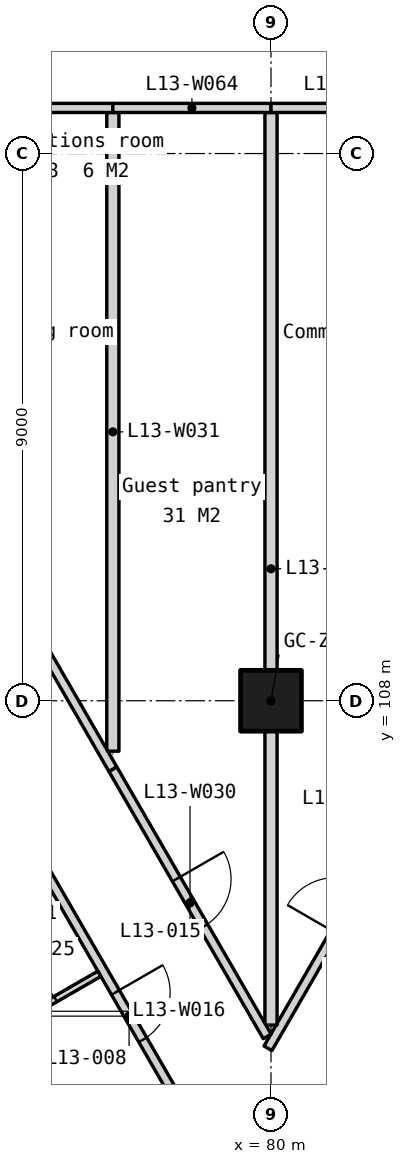
"""IFC4 building model, lengths in metres.
Left out: names, types, materials, properties, quantities, classifications, styles, units other than length and angle.
Written with IfcOpenShell. Run it as: python <this file> out.ifc"""

import sys

from ifc_helpers import new_model, si_unit, direction, frame, frame_2d, origin, origin_2d, place, context, subcontext, project, spatial, polyline, rectangle, outline, extrude, element, fill, save


model = new_model("IFC4")
c1 = context("Model", 3, precision=1e-05, world=origin(), true_north=direction((0.0, 1.0)))
c2 = subcontext(c1, "Body", "Model", "MODEL_VIEW")
j1 = project(units=[si_unit("LENGTHUNIT", "METRE"), si_unit("PLANEANGLEUNIT", "RADIAN")], contexts=[c1])
p1 = place(None, origin())
s1 = spatial("IfcSite", under=j1, at=p1, CompositionType="ELEMENT")
p2 = place(p1, origin())
s2 = spatial("IfcBuilding", under=s1, at=p2, CompositionType="ELEMENT")
p3 = place(p2, frame((0.0, 0.0, 59.5)))
s3 = spatial("IfcBuildingStorey", under=s2, at=p3, CompositionType="ELEMENT", Elevation=59.5)
p4 = place(p3, frame((80.0, 108.0, 0.0), z_axis=(0.0, 0.0, 1.0), x_axis=(1.0, 0.0, 0.0)))
e1 = element("IfcColumn", 1, at=p4, inside=s3, PredefinedType="COLUMN", context=c2, shape_type="SweptSolid", body=[
    extrude(rectangle(XDim=1.0, YDim=1.0, at=origin_2d()), origin(), (0.0, 0.0, 1.0), 3.5),
])
p5 = place(p3, frame((54.495, 129.397, -0.15), z_axis=(0.0, 0.0, 1.0), x_axis=(0.499999201451, -0.866025864826, 0.0)))
e2 = element("IfcWall", 2, at=p5, inside=s3, PredefinedType="SOLIDWALL", context=c2, shape_type="SweptSolid", body=[
    extrude(outline(polyline([(44.8, 0.0), (44.8, 3.5), (0.0, 3.5), (0.0, 0.0), (44.8, 0.0)])), frame((0.0, 0.225, 0.0), z_axis=(0.0, -1.0, 0.0), x_axis=(1.0, 0.0, 0.0)), (0.0, 0.0, 1.0), 0.45),
])
p6 = place(p5, frame((3.03, 0.0, 1.05)))
e3 = element("IfcOpeningElement", 3, at=p6, cuts=e2, PredefinedType="OPENING", context=c2, shape_type="SweptSolid", body=[
    extrude(rectangle(XDim=1.2, YDim=1.5, at=frame_2d((0.6, 0.75))), frame((0.0, 0.235, 0.0), z_axis=(0.0, -1.0, 0.0), x_axis=(1.0, 0.0, 0.0)), (0.0, 0.0, 1.0), 0.47),
])
p7 = place(p5, frame((4.73, 0.0, 1.05)))
e4 = element("IfcOpeningElement", 4, at=p7, cuts=e2, PredefinedType="OPENING", context=c2, shape_type="SweptSolid", body=[
    extrude(rectangle(XDim=1.2, YDim=1.5, at=frame_2d((0.6, 0.75))), frame((0.0, 0.235, 0.0), z_axis=(0.0, -1.0, 0.0), x_axis=(1.0, 0.0, 0.0)), (0.0, 0.0, 1.0), 0.47),
])
p8 = place(p5, frame((11.99, 0.0, 1.05)))
e5 = element("IfcOpeningElement", 5, at=p8, cuts=e2, PredefinedType="OPENING", context=c2, shape_type="SweptSolid", body=[
    extrude(rectangle(XDim=1.2, YDim=1.5, at=frame_2d((0.6, 0.75))), frame((0.0, 0.235, 0.0), z_axis=(0.0, -1.0, 0.0), x_axis=(1.0, 0.0, 0.0)), (0.0, 0.0, 1.0), 0.47),
])
p9 = place(p5, frame((13.69, 0.0, 1.05)))
e6 = element("IfcOpeningElement", 6, at=p9, cuts=e2, PredefinedType="OPENING", context=c2, shape_type="SweptSolid", body=[
    extrude(rectangle(XDim=1.2, YDim=1.5, at=frame_2d((0.6, 0.75))), frame((0.0, 0.235, 0.0), z_axis=(0.0, -1.0, 0.0), x_axis=(1.0, 0.0, 0.0)), (0.0, 0.0, 1.0), 0.47),
])
p10 = place(p5, frame((20.95, 0.0, 1.05)))
e7 = element("IfcOpeningElement", 7, at=p10, cuts=e2, PredefinedType="OPENING", context=c2, shape_type="SweptSolid", body=[
    extrude(rectangle(XDim=1.2, YDim=1.5, at=frame_2d((0.6, 0.75))), frame((0.0, 0.235, 0.0), z_axis=(0.0, -1.0, 0.0), x_axis=(1.0, 0.0, 0.0)), (0.0, 0.0, 1.0), 0.47),
])
p11 = place(p5, frame((22.65, 0.0, 1.05)))
e8 = element("IfcOpeningElement", 8, at=p11, cuts=e2, PredefinedType="OPENING", context=c2, shape_type="SweptSolid", body=[
    extrude(rectangle(XDim=1.2, YDim=1.5, at=frame_2d((0.6, 0.75))), frame((0.0, 0.235, 0.0), z_axis=(0.0, -1.0, 0.0), x_axis=(1.0, 0.0, 0.0)), (0.0, 0.0, 1.0), 0.47),
])
p12 = place(p5, frame((29.91, 0.0, 1.05)))
e9 = element("IfcOpeningElement", 9, at=p12, cuts=e2, PredefinedType="OPENING", context=c2, shape_type="SweptSolid", body=[
    extrude(rectangle(XDim=1.2, YDim=1.5, at=frame_2d((0.6, 0.75))), frame((0.0, 0.235, 0.0), z_axis=(0.0, -1.0, 0.0), x_axis=(1.0, 0.0, 0.0)), (0.0, 0.0, 1.0), 0.47),
])
p13 = place(p5, frame((31.61, 0.0, 1.05)))
e10 = element("IfcOpeningElement", 10, at=p13, cuts=e2, PredefinedType="OPENING", context=c2, shape_type="SweptSolid", body=[
    extrude(rectangle(XDim=1.2, YDim=1.5, at=frame_2d((0.6, 0.75))), frame((0.0, 0.235, 0.0), z_axis=(0.0, -1.0, 0.0), x_axis=(1.0, 0.0, 0.0)), (0.0, 0.0, 1.0), 0.47),
])
p14 = place(p5, frame((38.87, 0.0, 1.05)))
e11 = element("IfcOpeningElement", 11, at=p14, cuts=e2, PredefinedType="OPENING", context=c2, shape_type="SweptSolid", body=[
    extrude(rectangle(XDim=1.2, YDim=1.5, at=frame_2d((0.6, 0.75))), frame((0.0, 0.235, 0.0), z_axis=(0.0, -1.0, 0.0), x_axis=(1.0, 0.0, 0.0)), (0.0, 0.0, 1.0), 0.47),
])
p15 = place(p5, frame((40.57, 0.0, 1.05)))
e12 = element("IfcOpeningElement", 12, at=p15, cuts=e2, PredefinedType="OPENING", context=c2, shape_type="SweptSolid", body=[
    extrude(rectangle(XDim=1.2, YDim=1.5, at=frame_2d((0.6, 0.75))), frame((0.0, 0.235, 0.0), z_axis=(0.0, -1.0, 0.0), x_axis=(1.0, 0.0, 0.0)), (0.0, 0.0, 1.0), 0.47),
])
p16 = place(p3, frame((76.042, 105.626, 0.0), z_axis=(0.0, 0.0, 1.0), x_axis=(0.499991405182, -0.866030365948, 0.0)))
e13 = element("IfcWall", 13, at=p16, inside=s3, PredefinedType="PARTITIONING", context=c2, shape_type="SweptSolid", body=[
    extrude(rectangle(XDim=6.496, YDim=0.15, at=frame_2d((3.248, 0.0))), origin(), (0.0, 0.0, 1.0), 3.35),
])
p17 = place(p16, frame((2.798, 0.0, 0.0)))
e14 = element("IfcOpeningElement", 14, at=p17, cuts=e13, PredefinedType="OPENING", context=c2, shape_type="SweptSolid", body=[
    extrude(rectangle(XDim=0.9, YDim=2.1, at=frame_2d((0.45, 1.05))), frame((0.0, 0.085, 0.0), z_axis=(0.0, -1.0, 0.0), x_axis=(1.0, 0.0, 0.0)), (0.0, 0.0, 1.0), 0.17),
])
p18 = place(p3, frame((79.95, 102.284, 0.0), z_axis=(0.0, 0.0, 1.0), x_axis=(0.500026712466, 0.866009980786, 0.0)))
e15 = element("IfcWall", 15, at=p18, inside=s3, PredefinedType="PARTITIONING", context=c2, shape_type="SweptSolid", body=[
    extrude(rectangle(XDim=5.302, YDim=0.15, at=frame_2d((2.651, 0.0))), origin(), (0.0, 0.0, 1.0), 3.35),
])
p19 = place(p18, frame((2.201, 0.0, 0.0)))
e16 = element("IfcOpeningElement", 16, at=p19, cuts=e15, PredefinedType="OPENING", context=c2, shape_type="SweptSolid", body=[
    extrude(rectangle(XDim=0.9, YDim=2.1, at=frame_2d((0.45, 1.05))), frame((0.0, 0.085, 0.0), z_axis=(0.0, -1.0, 0.0), x_axis=(1.0, 0.0, 0.0)), (0.0, 0.0, 1.0), 0.17),
])
p20 = place(p3, frame((80.0, 102.666, 0.0), z_axis=(0.0, 0.0, 1.0), x_axis=(0.0, 1.0, 0.0)))
e17 = element("IfcWall", 17, at=p20, inside=s3, PredefinedType="PARTITIONING", context=c2, shape_type="SweptSolid", body=[
    extrude(rectangle(XDim=15.01, YDim=0.2, at=frame_2d((7.505, 0.0))), origin(), (0.0, 0.0, 1.0), 2.801),
])
p21 = place(p3, frame((75.042, 102.277, 0.0), z_axis=(0.0, 0.0, 1.0), x_axis=(0.865997559407, 0.500048224776, 0.0)))
e18 = element("IfcWall", 18, at=p21, inside=s3, PredefinedType="PARTITIONING", context=c2, shape_type="SweptSolid", body=[
    extrude(rectangle(XDim=2.465, YDim=0.1, at=frame_2d((1.232, 0.0))), origin(), (0.0, 0.0, 1.0), 3.35),
])
p22 = place(p21, frame((0.833, 0.0, 0.0)))
e19 = element("IfcOpeningElement", 19, at=p22, cuts=e18, PredefinedType="OPENING", context=c2, shape_type="SweptSolid", body=[
    extrude(rectangle(XDim=0.8, YDim=2.1, at=frame_2d((0.4, 1.05))), frame((0.0, 0.06, 0.0), z_axis=(0.0, -1.0, 0.0), x_axis=(1.0, 0.0, 0.0)), (0.0, 0.0, 1.0), 0.12),
])
p23 = place(p3, frame((80.775, 100.113, 0.0), z_axis=(0.0, 0.0, 1.0), x_axis=(0.5000079448, 0.866020816803, 0.0)))
e20 = element("IfcWall", 20, at=p23, inside=s3, PredefinedType="PARTITIONING", context=c2, shape_type="SweptSolid", body=[
    extrude(rectangle(XDim=6.366, YDim=0.15, at=frame_2d((3.183, 0.0))), origin(), (0.0, 0.0, 1.0), 3.35),
])
p24 = place(p23, frame((2.733, 0.0, 0.0)))
e21 = element("IfcOpeningElement", 21, at=p24, cuts=e20, PredefinedType="OPENING", context=c2, shape_type="SweptSolid", body=[
    extrude(rectangle(XDim=0.9, YDim=2.1, at=frame_2d((0.45, 1.05))), frame((0.0, 0.085, 0.0), z_axis=(0.0, -1.0, 0.0), x_axis=(1.0, 0.0, 0.0)), (0.0, 0.0, 1.0), 0.17),
])
p25 = place(p3, frame((77.399, 106.875, 0.0), z_axis=(0.0, 0.0, 1.0), x_axis=(0.500017996867, -0.866015013039, 0.0)))
e22 = element("IfcWall", 22, at=p25, inside=s3, PredefinedType="PARTITIONING", context=c2, shape_type="SweptSolid", body=[
    extrude(rectangle(XDim=5.077, YDim=0.15, at=frame_2d((2.539, 0.0))), origin(), (0.0, 0.0, 1.0), 3.35),
])
p26 = place(p25, frame((2.088, 0.0, 0.0)))
e23 = element("IfcOpeningElement", 23, at=p26, cuts=e22, PredefinedType="OPENING", context=c2, shape_type="SweptSolid", body=[
    extrude(rectangle(XDim=0.9, YDim=2.1, at=frame_2d((0.45, 1.05))), frame((0.0, 0.085, 0.0), z_axis=(0.0, -1.0, 0.0), x_axis=(1.0, 0.0, 0.0)), (0.0, 0.0, 1.0), 0.17),
])
p27 = place(p3, frame((77.399, 107.171, 0.0), z_axis=(0.0, 0.0, 1.0), x_axis=(0.0, 1.0, 0.0)))
e24 = element("IfcWall", 24, at=p27, inside=s3, PredefinedType="PARTITIONING", context=c2, shape_type="SweptSolid", body=[
    extrude(rectangle(XDim=10.504, YDim=0.2, at=frame_2d((5.252, 0.0))), origin(), (0.0, 0.0, 1.0), 3.35),
])
p28 = place(p3, frame((71.121, 117.75, 0.0), z_axis=(0.0, 0.0, 1.0), x_axis=(0.499995104884, -0.866028229963, 0.0)))
e25 = element("IfcWall", 25, at=p28, inside=s3, PredefinedType="PARTITIONING", context=c2, shape_type="SweptSolid", body=[
    extrude(rectangle(XDim=12.557, YDim=0.15, at=frame_2d((6.278, 0.0))), origin(), (0.0, 0.0, 1.0), 3.35),
])
p29 = place(p28, frame((5.828, 0.0, 0.0)))
e26 = element("IfcOpeningElement", 26, at=p29, cuts=e25, PredefinedType="OPENING", context=c2, shape_type="SweptSolid", body=[
    extrude(rectangle(XDim=0.9, YDim=2.1, at=frame_2d((0.45, 1.05))), frame((0.0, 0.085, 0.0), z_axis=(0.0, -1.0, 0.0), x_axis=(1.0, 0.0, 0.0)), (0.0, 0.0, 1.0), 0.17),
])
p30 = place(p3, frame((71.25, 117.75, 0.0), z_axis=(0.0, 0.0, 1.0), x_axis=(1.0, 0.0, 0.0)))
e27 = element("IfcWall", 27, at=p30, inside=s3, PredefinedType="PARTITIONING", context=c2, shape_type="SweptSolid", body=[
    extrude(rectangle(XDim=6.148, YDim=0.15, at=frame_2d((3.074, 0.0))), origin(), (0.0, 0.0, 1.0), 3.35),
])
for number, where, z_axis, x_axis in (
    (28, (77.399, 117.75, 0.0), (0.0, 0.0, 1.0), (1.0, 0.0, 0.0)),
    (29, (80.0, 117.75, 0.0), (0.0, 0.0, 1.0), (1.0, 0.0, 0.0)),
):
    element("IfcWall", number, at=place(p3, frame(where, z_axis=z_axis, x_axis=x_axis)), inside=s3, PredefinedType="PARTITIONING", context=c2, shape_type="SweptSolid", body=[
        extrude(rectangle(XDim=2.601, YDim=0.15, at=frame_2d((1.301, 0.0))), origin(), (0.0, 0.0, 1.0), 3.35),
    ])
p31 = place(p17, origin())
e30 = element("IfcDoor", 30, at=p31, inside=s3, OperationType="SINGLE_SWING_LEFT", PredefinedType="DOOR", context=c2, shape_type="SweptSolid", body=[
    extrude(rectangle(XDim=0.9, YDim=2.1, at=frame_2d((0.45, 1.05))), frame((0.0, 0.025, 0.0), z_axis=(0.0, -1.0, 0.0), x_axis=(1.0, 0.0, 0.0)), (0.0, 0.0, 1.0), 0.05),
])
fill(e14, e30)
p32 = place(p26, origin())
e31 = element("IfcDoor", 31, at=p32, inside=s3, OperationType="SINGLE_SWING_LEFT", PredefinedType="DOOR", context=c2, shape_type="SweptSolid", body=[
    extrude(rectangle(XDim=0.9, YDim=2.1, at=frame_2d((0.45, 1.05))), frame((0.0, 0.025, 0.0), z_axis=(0.0, -1.0, 0.0), x_axis=(1.0, 0.0, 0.0)), (0.0, 0.0, 1.0), 0.05),
])
fill(e23, e31)
p33 = place(p22, origin())
e32 = element("IfcDoor", 32, at=p33, inside=s3, OperationType="SINGLE_SWING_LEFT", PredefinedType="DOOR", context=c2, shape_type="SweptSolid", body=[
    extrude(rectangle(XDim=0.8, YDim=2.1, at=frame_2d((0.4, 1.05))), frame((0.0, 0.025, 0.0), z_axis=(0.0, -1.0, 0.0), x_axis=(1.0, 0.0, 0.0)), (0.0, 0.0, 1.0), 0.05),
])
fill(e19, e32)
save(model, sys.argv[1])
